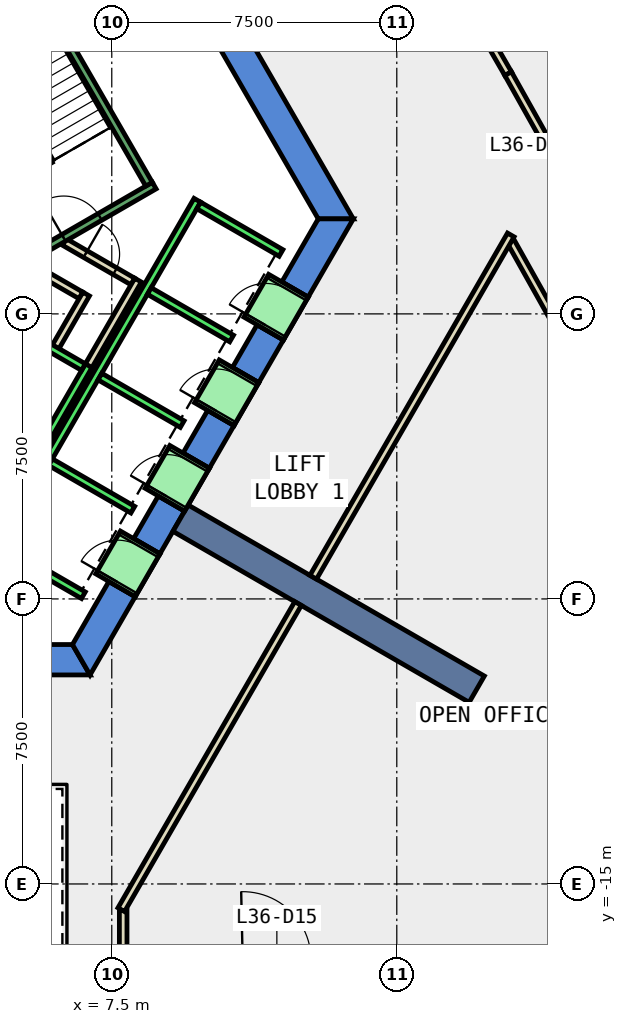
"""IFC4 building model, lengths in metres.
Left out: names, types, materials, properties, quantities, classifications, styles, units other than length and angle.
Written with IfcOpenShell. Run it as: python <this file> out.ifc"""

import sys

from ifc_helpers import new_model, si_unit, direction, frame, frame_2d, origin, place, context, subcontext, project, spatial, polyline, rectangle, outline, extrude, element, fill, save


model = new_model("IFC4")
c1 = context("Model", 3, precision=1e-05, world=origin(), true_north=direction((0.0, 1.0)))
c2 = subcontext(c1, "Body", "Model", "MODEL_VIEW")
j1 = project(units=[si_unit("LENGTHUNIT", "METRE"), si_unit("PLANEANGLEUNIT", "RADIAN")], contexts=[c1])
p1 = place(None, origin())
s1 = spatial("IfcSite", under=j1, at=p1, CompositionType="ELEMENT")
p2 = place(p1, origin())
s2 = spatial("IfcBuilding", under=s1, at=p2, CompositionType="ELEMENT")
p3 = place(p2, frame((0.0, 0.0, 163.4)))
s3 = spatial("IfcBuildingStorey", under=s2, at=p3, CompositionType="ELEMENT", Elevation=163.4)
p4 = place(p3, frame((0.0, 0.0, -0.4)))
e1 = element("IfcWall", 1, at=p4, inside=s3, PredefinedType="SHEAR", context=c2, shape_type="SweptSolid", body=[
    extrude(outline(polyline([(8.517, 11.748), (7.824, 11.348), (12.933, 2.5), (13.856, 2.5), (8.517, 11.748)])), origin(), (0.0, 0.0, 1.0), 4.2),
])
p5 = place(p3, frame((0.0, 0.0, -0.4)))
e2 = element("IfcWall", 2, at=p5, inside=s3, PredefinedType="SHEAR", context=c2, shape_type="SweptSolid", body=[
    extrude(outline(polyline([(5.75, -8.7), (5.75, -9.5), (6.928, -9.5), (6.466, -8.7), (5.75, -8.7)])), origin(), (0.0, 0.0, 1.0), 4.2),
])
p6 = place(p3, frame((0.0, 0.0, -0.4)))
e3 = element("IfcWall", 3, at=p6, inside=s3, PredefinedType="SHEAR", context=c2, shape_type="SweptSolid", body=[
    extrude(outline(polyline([(8.117, -7.44), (7.424, -7.04), (6.466, -8.7), (6.928, -9.5), (8.117, -7.44)])), origin(), (0.0, 0.0, 1.0), 4.2),
])
p7 = place(p3, frame((0.0, 0.0, -0.4)))
e4 = element("IfcWall", 4, at=p7, inside=s3, PredefinedType="SHEAR", context=c2, shape_type="SweptSolid", body=[
    extrude(outline(polyline([(9.417, -5.189), (8.724, -4.789), (8.075, -5.914), (8.767, -6.314), (9.417, -5.189)])), origin(), (0.0, 0.0, 1.0), 4.2),
])
p8 = place(p3, frame((0.0, 0.0, -0.4)))
e5 = element("IfcWall", 5, at=p8, inside=s3, PredefinedType="SHEAR", context=c2, shape_type="SweptSolid", body=[
    extrude(outline(polyline([(10.717, -2.937), (10.025, -2.537), (9.374, -3.663), (10.067, -4.063), (10.717, -2.937)])), origin(), (0.0, 0.0, 1.0), 4.2),
])
p9 = place(p3, frame((0.0, 0.0, -0.4)))
e6 = element("IfcWall", 6, at=p9, inside=s3, PredefinedType="SHEAR", context=c2, shape_type="SweptSolid", body=[
    extrude(outline(polyline([(12.017, -0.686), (11.324, -0.286), (10.675, -1.411), (11.367, -1.811), (12.017, -0.686)])), origin(), (0.0, 0.0, 1.0), 4.2),
])
p10 = place(p3, frame((0.0, 0.0, -0.4)))
e7 = element("IfcWall", 7, at=p10, inside=s3, PredefinedType="SHEAR", context=c2, shape_type="SweptSolid", body=[
    extrude(outline(polyline([(11.974, 0.84), (12.667, 0.44), (13.856, 2.5), (12.933, 2.5), (11.974, 0.84)])), origin(), (0.0, 0.0, 1.0), 4.2),
])
p11 = place(p3, frame((0.0, 0.0, 3.6)))
e8 = element("IfcWall", 8, at=p11, inside=s3, PredefinedType="SHEAR", context=c2, shape_type="SweptSolid", body=[
    extrude(outline(polyline([(8.767, -6.314), (8.075, -5.914), (7.424, -7.04), (8.117, -7.44), (8.767, -6.314)])), origin(), (0.0, 0.0, 1.0), 0.2),
])
p12 = place(p3, frame((0.0, 0.0, 3.6)))
e9 = element("IfcWall", 9, at=p12, inside=s3, PredefinedType="SHEAR", context=c2, shape_type="SweptSolid", body=[
    extrude(outline(polyline([(10.067, -4.063), (9.374, -3.663), (8.724, -4.789), (9.417, -5.189), (10.067, -4.063)])), origin(), (0.0, 0.0, 1.0), 0.2),
])
p13 = place(p3, frame((0.0, 0.0, 3.6)))
e10 = element("IfcWall", 10, at=p13, inside=s3, PredefinedType="SHEAR", context=c2, shape_type="SweptSolid", body=[
    extrude(outline(polyline([(11.367, -1.811), (10.675, -1.411), (10.025, -2.537), (10.717, -2.937), (11.367, -1.811)])), origin(), (0.0, 0.0, 1.0), 0.2),
])
p14 = place(p3, frame((0.0, 0.0, 3.6)))
e11 = element("IfcWall", 11, at=p14, inside=s3, PredefinedType="SHEAR", context=c2, shape_type="SweptSolid", body=[
    extrude(outline(polyline([(12.667, 0.44), (11.974, 0.84), (11.324, -0.286), (12.017, -0.686), (12.667, 0.44)])), origin(), (0.0, 0.0, 1.0), 0.2),
])
p15 = place(p3, frame((9.31, -5.375, -0.4), z_axis=(0.0, 0.0, 1.0), x_axis=(0.866017533419, -0.500013631625, 0.0)))
e12 = element("IfcWall", 12, at=p15, inside=s3, PredefinedType="SHEAR", context=c2, shape_type="SweptSolid", body=[
    extrude(rectangle(XDim=9.0, YDim=0.8, at=frame_2d((4.5, 0.0))), origin(), (0.0, 0.0, 1.0), 4.2),
])
p16 = place(p3, frame((15.987, -16.893, 0.0), z_axis=(0.0, 0.0, 1.0), x_axis=(0.999316060953, 0.036978511606, 0.0)))
e13 = element("IfcWall", 13, at=p16, inside=s3, PredefinedType="PARTITIONING", context=c2, shape_type="SweptSolid", body=[
    extrude(rectangle(XDim=7.355, YDim=0.2, at=frame_2d((3.677, 0.0))), origin(), (0.0, 0.0, 1.0), 3.8),
])
p17 = place(p3, frame((19.506, -0.785, 0.0), z_axis=(0.0, 0.0, 1.0), x_axis=(-0.489049603292, 0.872255974769, 0.0)))
e14 = element("IfcWall", 14, at=p17, inside=s3, PredefinedType="PARTITIONING", context=c2, shape_type="SweptSolid", body=[
    extrude(rectangle(XDim=3.082, YDim=0.2, at=frame_2d((1.541, 0.0))), origin(), (0.0, 0.0, 1.0), 3.8),
])
p18 = place(p3, frame((16.222, 9.28, 0.0), z_axis=(0.0, 0.0, 1.0), x_axis=(0.499920397431, -0.866071357471, 0.0)))
e15 = element("IfcWall", 15, at=p18, inside=s3, PredefinedType="PARTITIONING", context=c2, shape_type="SweptSolid", body=[
    extrude(rectangle(XDim=3.417, YDim=0.2, at=frame_2d((1.708, 0.0))), origin(), (0.0, 0.0, 1.0), 3.8),
])
p19 = place(p3, frame((17.93, 6.321, 0.0), z_axis=(0.0, 0.0, 1.0), x_axis=(0.489044053781, -0.872259086202, 0.0)))
e16 = element("IfcWall", 16, at=p19, inside=s3, PredefinedType="PARTITIONING", context=c2, shape_type="SweptSolid", body=[
    extrude(rectangle(XDim=6.983, YDim=0.2, at=frame_2d((3.492, 0.0))), origin(), (0.0, 0.0, 1.0), 3.8),
])
p20 = place(p19, frame((2.991, 0.0, 0.0)))
e17 = element("IfcOpeningElement", 17, at=p20, cuts=e16, PredefinedType="OPENING", context=c2, shape_type="SweptSolid", body=[
    extrude(rectangle(XDim=1.0, YDim=2.1, at=frame_2d((0.5, 1.05))), frame((0.0, 0.11, 0.0), z_axis=(0.0, -1.0, 0.0), x_axis=(1.0, 0.0, 0.0)), (0.0, 0.0, 1.0), 0.22),
])
p21 = place(p3, frame((5.499, 1.172, 0.0), z_axis=(0.0, 0.0, 1.0), x_axis=(0.866333505267, -0.499465972466, 0.0)))
e18 = element("IfcWall", 18, at=p21, inside=s3, PredefinedType="PARTITIONING", context=c2, shape_type="SweptSolid", body=[
    extrude(rectangle(XDim=1.374, YDim=0.2, at=frame_2d((0.687, 0.0))), origin(), (0.0, 0.0, 1.0), 3.8),
])
p22 = place(p3, frame((6.826, 0.522, 0.0), z_axis=(0.0, 0.0, 1.0), x_axis=(-0.500016722714, -0.866015748706, 0.0)))
e19 = element("IfcWall", 19, at=p22, inside=s3, PredefinedType="PARTITIONING", context=c2, shape_type="SweptSolid", body=[
    extrude(rectangle(XDim=1.7, YDim=0.2, at=frame_2d((0.85, 0.0))), origin(), (0.0, 0.0, 1.0), 3.8),
])
p23 = place(p3, frame((6.25, 1.894, 0.0), z_axis=(0.0, 0.0, 1.0), x_axis=(0.866043184279, -0.499969202016, 0.0)))
e20 = element("IfcWall", 20, at=p23, inside=s3, PredefinedType="PARTITIONING", context=c2, shape_type="SweptSolid", body=[
    extrude(rectangle(XDim=2.084, YDim=0.2, at=frame_2d((1.042, 0.0))), origin(), (0.0, 0.0, 1.0), 3.8),
])
p24 = place(p23, frame((0.642, 0.0, 0.0)))
e21 = element("IfcOpeningElement", 21, at=p24, cuts=e20, PredefinedType="OPENING", context=c2, shape_type="SweptSolid", body=[
    extrude(rectangle(XDim=0.9, YDim=2.1, at=frame_2d((0.45, 1.05))), frame((0.0, 0.11, 0.0), z_axis=(0.0, -1.0, 0.0), x_axis=(1.0, 0.0, 0.0)), (0.0, 0.0, 1.0), 0.22),
])
p25 = place(p3, frame((8.192, 0.888, 0.0), z_axis=(0.0, 0.0, 1.0), x_axis=(-0.499940625693, -0.866059680843, 0.0)))
e22 = element("IfcWall", 22, at=p25, inside=s3, PredefinedType="PARTITIONING", context=c2, shape_type="SweptSolid", body=[
    extrude(rectangle(XDim=2.68, YDim=0.2, at=frame_2d((1.34, 0.0))), origin(), (0.0, 0.0, 1.0), 3.8),
])
p26 = place(p3, frame((7.8, -15.69, 0.0), z_axis=(0.0, 0.0, 1.0), x_axis=(0.0, -1.0, 0.0)))
e23 = element("IfcWall", 23, at=p26, inside=s3, PredefinedType="PARTITIONING", context=c2, shape_type="SweptSolid", body=[
    extrude(rectangle(XDim=1.281, YDim=0.2, at=frame_2d((0.641, 0.0))), origin(), (0.0, 0.0, 1.0), 3.8),
])
p27 = place(p3, frame((18.0, 2.077, 0.0), z_axis=(0.0, 0.0, 1.0), x_axis=(-0.499959557847, -0.866048751813, 0.0)))
e24 = element("IfcWall", 24, at=p27, inside=s3, PredefinedType="PARTITIONING", context=c2, shape_type="SweptSolid", body=[
    extrude(rectangle(XDim=10.399, YDim=0.2, at=frame_2d((5.199, 0.0))), origin(), (0.0, 0.0, 1.0), 3.8),
])
p28 = place(p3, frame((12.401, -7.621, 0.0), z_axis=(0.0, 0.0, 1.0), x_axis=(-0.499983724212, -0.866034800411, 0.0)))
e25 = element("IfcWall", 25, at=p28, inside=s3, PredefinedType="PARTITIONING", context=c2, shape_type="SweptSolid", body=[
    extrude(rectangle(XDim=9.302, YDim=0.2, at=frame_2d((4.651, 0.0))), origin(), (0.0, 0.0, 1.0), 3.8),
])
p29 = place(p3, frame((5.492, -3.788, 0.0), z_axis=(0.0, 0.0, 1.0), x_axis=(0.500011755427, 0.866018616679, 0.0)))
e26 = element("IfcWall", 26, at=p29, inside=s3, PredefinedType="STANDARD", context=c2, shape_type="SweptSolid", body=[
    extrude(rectangle(XDim=2.8, YDim=0.2, at=frame_2d((1.4, 0.0))), origin(), (0.0, 0.0, 1.0), 3.8),
])
p30 = place(p3, frame((4.677, -0.2, 0.0), z_axis=(0.0, 0.0, 1.0), x_axis=(0.865973769406, -0.500089422704, 0.0)))
e27 = element("IfcWall", 27, at=p30, inside=s3, PredefinedType="STANDARD", context=c2, shape_type="SweptSolid", body=[
    extrude(rectangle(XDim=2.399, YDim=0.2, at=frame_2d((1.2, 0.0))), origin(), (0.0, 0.0, 1.0), 3.8),
])
p31 = place(p3, frame((4.451, -6.19, 0.0), z_axis=(0.0, 0.0, 1.0), x_axis=(0.50000090737, 0.866024879913, 0.0)))
e28 = element("IfcWall", 28, at=p31, inside=s3, PredefinedType="STANDARD", context=c2, shape_type="SweptSolid", body=[
    extrude(rectangle(XDim=10.6, YDim=0.2, at=frame_2d((5.3, 0.0))), origin(), (0.0, 0.0, 1.0), 3.8),
])
for number, where, z_axis, x_axis in (
    (29, (4.588, -6.153, 0.0), (0.0, 0.0, 1.0), (0.866, -0.5, 0.0)),
    (30, (5.888, -3.902, 0.0), (0.0, 0.0, 1.0), (0.866, -0.5, 0.0)),
    (31, (7.188, -1.65, 0.0), (0.0, 0.0, 1.0), (0.866, -0.5, 0.0)),
    (32, (8.488, 0.602, 0.0), (0.0, 0.0, 1.0), (0.866, -0.5, 0.0)),
):
    element("IfcWall", number, at=place(p3, frame(where, z_axis=z_axis, x_axis=x_axis)), inside=s3, PredefinedType="STANDARD", context=c2, shape_type="SweptSolid", body=[
        extrude(rectangle(XDim=2.5, YDim=0.2, at=frame_2d((1.25, 0.0))), origin(), (0.0, 0.0, 1.0), 3.8),
    ])
p32 = place(p3, frame((9.788, 2.853, 0.0), z_axis=(0.0, 0.0, 1.0), x_axis=(0.865998541277, -0.500046524342, 0.0)))
e33 = element("IfcWall", 33, at=p32, inside=s3, PredefinedType="STANDARD", context=c2, shape_type="SweptSolid", body=[
    extrude(rectangle(XDim=2.5, YDim=0.2, at=frame_2d((1.25, 0.0))), origin(), (0.0, 0.0, 1.0), 3.8),
])
p33 = place(p3, frame((7.598, -7.14, 0.0), z_axis=(0.0, 0.0, 1.0), x_axis=(0.500362116554, 0.865816234728, 0.0)))
e34 = element("IfcWall", 34, at=p33, inside=s3, PredefinedType="STANDARD", context=c2, shape_type="SweptSolid", body=[
    extrude(rectangle(XDim=1.299, YDim=1.2, at=frame_2d((0.65, 0.0))), origin(), (0.0, 0.0, 1.0), 2.4),
])
p34 = place(p33, frame((0.1, 0.0, 0.0)))
e35 = element("IfcOpeningElement", 35, at=p34, cuts=e34, PredefinedType="OPENING", context=c2, shape_type="SweptSolid", body=[
    extrude(rectangle(XDim=1.1, YDim=2.3, at=frame_2d((0.55, 1.15))), frame((0.0, 0.61, 0.0), z_axis=(0.0, -1.0, 0.0), x_axis=(1.0, 0.0, 0.0)), (0.0, 0.0, 1.0), 1.22),
])
p35 = place(p3, frame((8.898, -4.889, 0.0), z_axis=(0.0, 0.0, 1.0), x_axis=(0.500036693733, 0.866004217611, 0.0)))
e36 = element("IfcWall", 36, at=p35, inside=s3, PredefinedType="STANDARD", context=c2, shape_type="SweptSolid", body=[
    extrude(rectangle(XDim=1.3, YDim=1.2, at=frame_2d((0.65, 0.0))), origin(), (0.0, 0.0, 1.0), 2.4),
])
p36 = place(p35, frame((0.1, 0.0, 0.0)))
e37 = element("IfcOpeningElement", 37, at=p36, cuts=e36, PredefinedType="OPENING", context=c2, shape_type="SweptSolid", body=[
    extrude(rectangle(XDim=1.1, YDim=2.3, at=frame_2d((0.55, 1.15))), frame((0.0, 0.61, 0.0), z_axis=(0.0, -1.0, 0.0), x_axis=(1.0, 0.0, 0.0)), (0.0, 0.0, 1.0), 1.22),
])
p37 = place(p3, frame((10.198, -2.637, 0.0), z_axis=(0.0, 0.0, 1.0), x_axis=(0.49989585183, 0.866085525409, 0.0)))
e38 = element("IfcWall", 38, at=p37, inside=s3, PredefinedType="STANDARD", context=c2, shape_type="SweptSolid", body=[
    extrude(rectangle(XDim=1.3, YDim=1.2, at=frame_2d((0.65, 0.0))), origin(), (0.0, 0.0, 1.0), 2.4),
])
p38 = place(p37, frame((0.1, 0.0, 0.0)))
e39 = element("IfcOpeningElement", 39, at=p38, cuts=e38, PredefinedType="OPENING", context=c2, shape_type="SweptSolid", body=[
    extrude(rectangle(XDim=1.1, YDim=2.3, at=frame_2d((0.55, 1.15))), frame((0.0, 0.61, 0.0), z_axis=(0.0, -1.0, 0.0), x_axis=(1.0, 0.0, 0.0)), (0.0, 0.0, 1.0), 1.22),
])
p39 = place(p3, frame((11.498, -0.385, 0.0), z_axis=(0.0, 0.0, 1.0), x_axis=(0.500221244143, 0.865897630733, 0.0)))
e40 = element("IfcWall", 40, at=p39, inside=s3, PredefinedType="STANDARD", context=c2, shape_type="SweptSolid", body=[
    extrude(rectangle(XDim=1.299, YDim=1.2, at=frame_2d((0.65, 0.0))), origin(), (0.0, 0.0, 1.0), 2.4),
])
p40 = place(p39, frame((0.1, 0.0, 0.0)))
e41 = element("IfcOpeningElement", 41, at=p40, cuts=e40, PredefinedType="OPENING", context=c2, shape_type="SweptSolid", body=[
    extrude(rectangle(XDim=1.1, YDim=2.3, at=frame_2d((0.55, 1.15))), frame((0.0, 0.61, 0.0), z_axis=(0.0, -1.0, 0.0), x_axis=(1.0, 0.0, 0.0)), (0.0, 0.0, 1.0), 1.22),
])
p41 = place(p3, frame((4.806, 1.176, 0.0), z_axis=(0.0, 0.0, 1.0), x_axis=(0.866059941101, 0.499940174841, 0.0)))
e42 = element("IfcWall", 42, at=p41, inside=s3, PredefinedType="STANDARD", context=c2, shape_type="SweptSolid", body=[
    extrude(rectangle(XDim=4.4, YDim=0.2, at=frame_2d((2.2, 0.0))), origin(), (0.0, 0.0, 1.0), 3.8),
])
p42 = place(p41, frame((1.65, 0.0, 0.0)))
e43 = element("IfcOpeningElement", 43, at=p42, cuts=e42, PredefinedType="OPENING", context=c2, shape_type="SweptSolid", body=[
    extrude(rectangle(XDim=1.1, YDim=2.2, at=frame_2d((0.55, 1.1))), frame((0.0, 0.11, 0.0), z_axis=(0.0, -1.0, 0.0), x_axis=(1.0, 0.0, 0.0)), (0.0, 0.0, 1.0), 0.22),
])
p43 = place(p3, frame((8.48, 3.412, 0.0), z_axis=(0.0, 0.0, 1.0), x_axis=(-0.499978703459, 0.866037698999, 0.0)))
e44 = element("IfcWall", 44, at=p43, inside=s3, PredefinedType="STANDARD", context=c2, shape_type="SweptSolid", body=[
    extrude(rectangle(XDim=6.9, YDim=0.2, at=frame_2d((3.45, 0.0))), origin(), (0.0, 0.0, 1.0), 3.8),
])
p44 = place(p24, origin())
e45 = element("IfcDoor", 45, at=p44, inside=s3, OperationType="SINGLE_SWING_LEFT", PredefinedType="DOOR", context=c2, shape_type="SweptSolid", body=[
    extrude(rectangle(XDim=0.9, YDim=2.1, at=frame_2d((0.45, 1.05))), frame((0.0, 0.025, 0.0), z_axis=(0.0, -1.0, 0.0), x_axis=(1.0, 0.0, 0.0)), (0.0, 0.0, 1.0), 0.05),
])
fill(e21, e45)
p45 = place(p34, origin())
e46 = element("IfcDoor", 46, at=p45, inside=s3, OperationType="SLIDING_TO_LEFT", PredefinedType="DOOR", context=c2, shape_type="SweptSolid", body=[
    extrude(rectangle(XDim=1.1, YDim=2.3, at=frame_2d((0.55, 1.15))), frame((0.0, 0.025, 0.0), z_axis=(0.0, -1.0, 0.0), x_axis=(1.0, 0.0, 0.0)), (0.0, 0.0, 1.0), 0.05),
])
fill(e35, e46)
p46 = place(p36, origin())
e47 = element("IfcDoor", 47, at=p46, inside=s3, OperationType="SLIDING_TO_LEFT", PredefinedType="DOOR", context=c2, shape_type="SweptSolid", body=[
    extrude(rectangle(XDim=1.1, YDim=2.3, at=frame_2d((0.55, 1.15))), frame((0.0, 0.025, 0.0), z_axis=(0.0, -1.0, 0.0), x_axis=(1.0, 0.0, 0.0)), (0.0, 0.0, 1.0), 0.05),
])
fill(e37, e47)
p47 = place(p38, origin())
e48 = element("IfcDoor", 48, at=p47, inside=s3, OperationType="SLIDING_TO_LEFT", PredefinedType="DOOR", context=c2, shape_type="SweptSolid", body=[
    extrude(rectangle(XDim=1.1, YDim=2.3, at=frame_2d((0.55, 1.15))), frame((0.0, 0.025, 0.0), z_axis=(0.0, -1.0, 0.0), x_axis=(1.0, 0.0, 0.0)), (0.0, 0.0, 1.0), 0.05),
])
fill(e39, e48)
p48 = place(p40, origin())
e49 = element("IfcDoor", 49, at=p48, inside=s3, OperationType="SLIDING_TO_LEFT", PredefinedType="DOOR", context=c2, shape_type="SweptSolid", body=[
    extrude(rectangle(XDim=1.1, YDim=2.3, at=frame_2d((0.55, 1.15))), frame((0.0, 0.025, 0.0), z_axis=(0.0, -1.0, 0.0), x_axis=(1.0, 0.0, 0.0)), (0.0, 0.0, 1.0), 0.05),
])
fill(e41, e49)
p49 = place(p42, origin())
e50 = element("IfcDoor", 50, at=p49, inside=s3, OperationType="SINGLE_SWING_LEFT", PredefinedType="DOOR", context=c2, shape_type="SweptSolid", body=[
    extrude(rectangle(XDim=1.1, YDim=2.2, at=frame_2d((0.55, 1.1))), frame((0.0, 0.025, 0.0), z_axis=(0.0, -1.0, 0.0), x_axis=(1.0, 0.0, 0.0)), (0.0, 0.0, 1.0), 0.05),
])
fill(e43, e50)
save(model, sys.argv[1])
